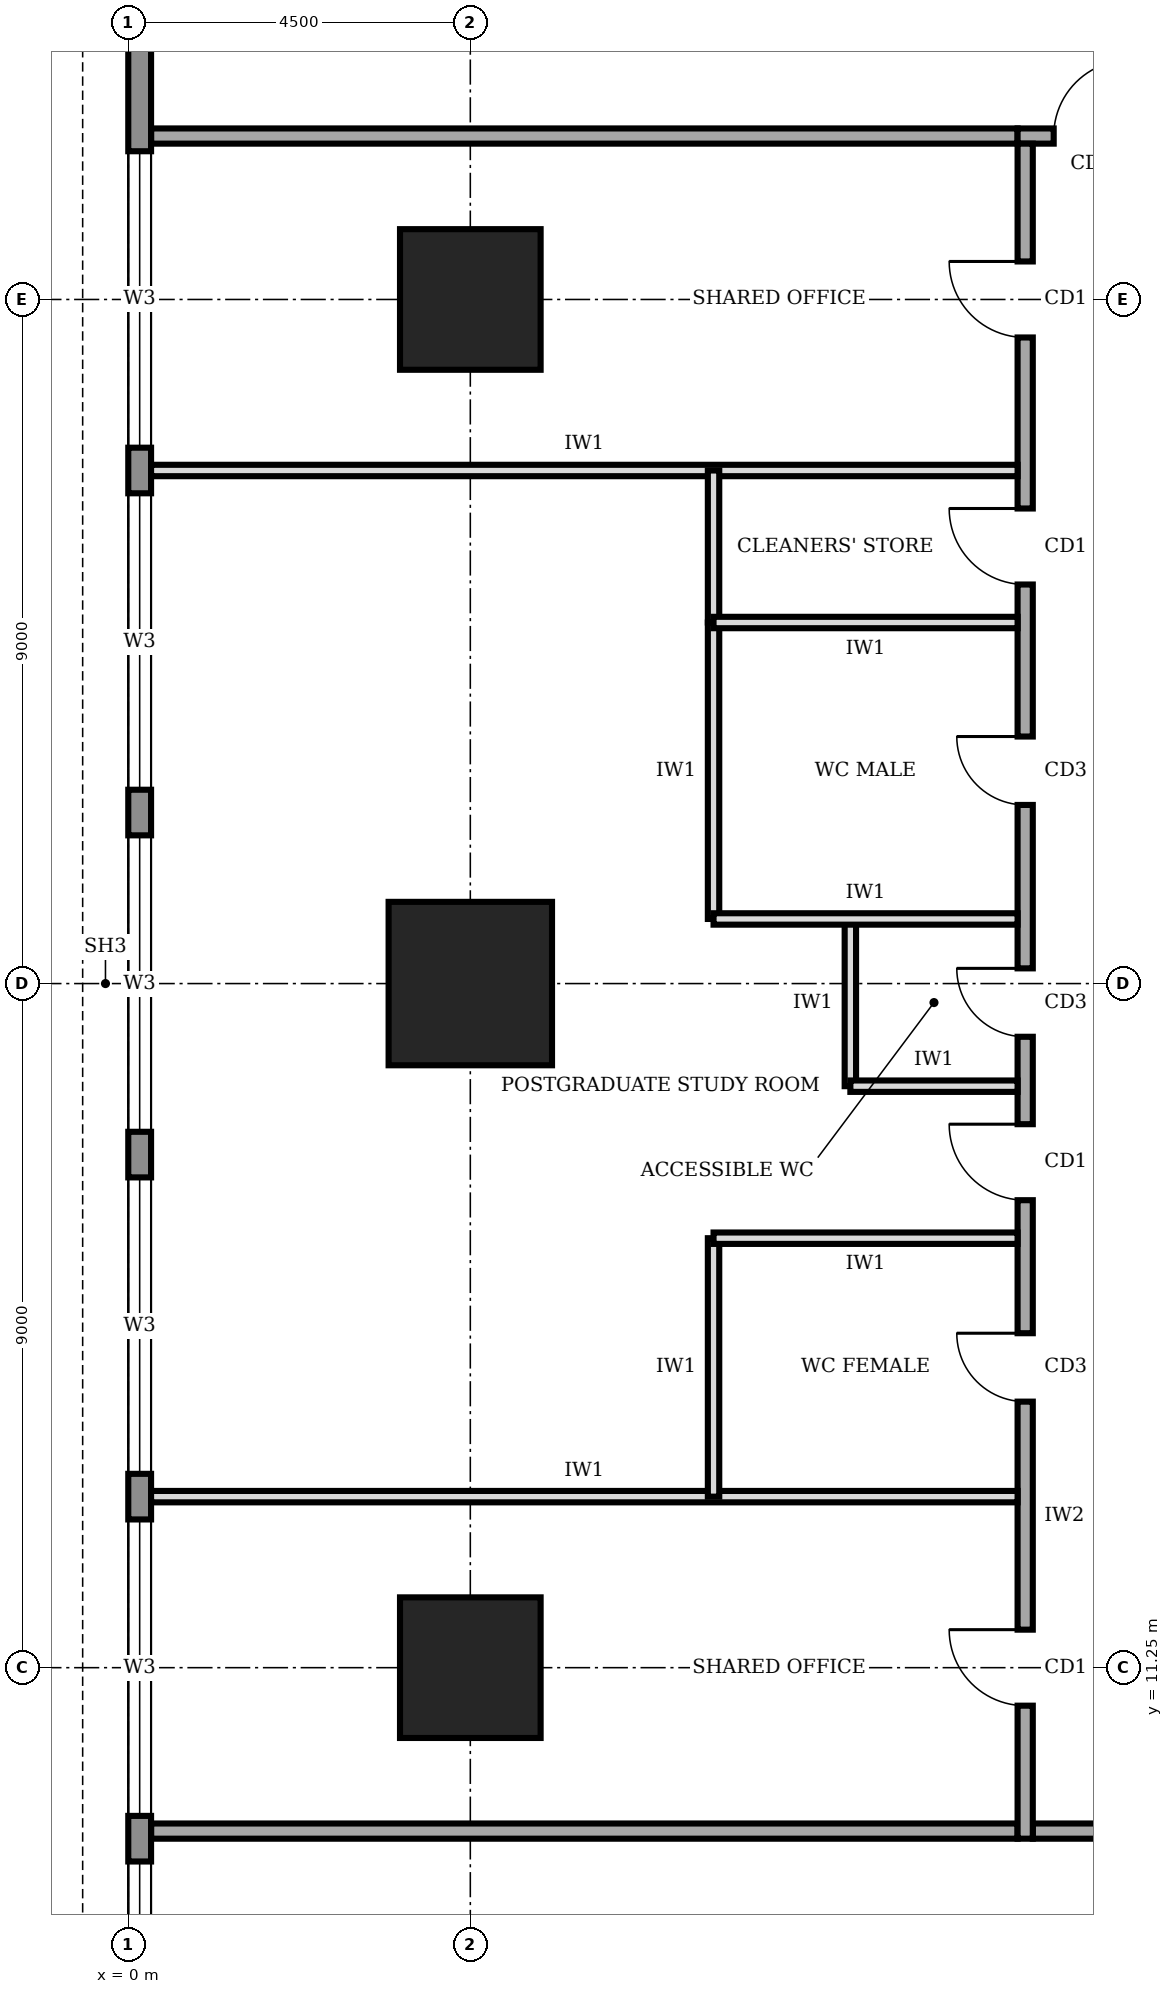
"""IFC4 building model, lengths in metres.
Left out: names, types, materials, properties, quantities, classifications, styles, units other than length and angle.
Written with IfcOpenShell. Run it as: python <this file> out.ifc"""

import sys

from ifc_helpers import new_model, si_unit, direction, frame, frame_2d, origin, origin_2d, place, context, subcontext, project, spatial, rectangle, extrude, element, fill, save


model = new_model("IFC4")
c1 = context("Model", 3, precision=1e-05, world=origin(), true_north=direction((0.0, 1.0)))
c2 = subcontext(c1, "Body", "Model", "MODEL_VIEW")
j1 = project(units=[si_unit("LENGTHUNIT", "METRE"), si_unit("PLANEANGLEUNIT", "RADIAN")], contexts=[c1])
p1 = place(None, origin())
s1 = spatial("IfcSite", under=j1, at=p1, CompositionType="ELEMENT")
p2 = place(p1, origin())
s2 = spatial("IfcBuilding", under=s1, at=p2, CompositionType="ELEMENT")
p3 = place(p2, frame((0.0, 0.0, 257.0)))
s3 = spatial("IfcBuildingStorey", under=s2, at=p3, CompositionType="ELEMENT", Elevation=257.0)
p4 = place(p3, frame((4.5, 11.25, 0.0), z_axis=(0.0, 0.0, 1.0), x_axis=(1.0, 0.0, 0.0)))
e1 = element("IfcColumn", 1, at=p4, inside=s3, PredefinedType="COLUMN", context=c2, shape_type="SweptSolid", body=[
    extrude(rectangle(XDim=1.85, YDim=1.85, at=origin_2d()), origin(), (0.0, 0.0, 1.0), 4.0),
])
p5 = place(p3, frame((4.5, 20.25, 0.0), z_axis=(0.0, 0.0, 1.0), x_axis=(1.0, 0.0, 0.0)))
e2 = element("IfcColumn", 2, at=p5, inside=s3, PredefinedType="COLUMN", context=c2, shape_type="SweptSolid", body=[
    extrude(rectangle(XDim=2.15, YDim=2.15, at=origin_2d()), origin(), (0.0, 0.0, 1.0), 4.0),
])
p6 = place(p3, frame((4.5, 29.25, 0.0), z_axis=(0.0, 0.0, 1.0), x_axis=(1.0, 0.0, 0.0)))
e3 = element("IfcColumn", 3, at=p6, inside=s3, PredefinedType="COLUMN", context=c2, shape_type="SweptSolid", body=[
    extrude(rectangle(XDim=1.85, YDim=1.85, at=origin_2d()), origin(), (0.0, 0.0, 1.0), 4.0),
])
p7 = place(p3, frame((0.15, 35.98, 0.0), z_axis=(0.0, 0.0, 1.0), x_axis=(0.0, -1.0, 0.0)))
e4 = element("IfcWall", 4, at=p7, inside=s3, PredefinedType="STANDARD", context=c2, shape_type="SweptSolid", body=[
    extrude(rectangle(XDim=31.46, YDim=0.3, at=frame_2d((15.73, 0.0))), origin(), (0.0, 0.0, 1.0), 3.75),
])
p8 = place(p7, frame((27.28, 0.0, 0.95)))
e5 = element("IfcOpeningElement", 5, at=p8, cuts=e4, PredefinedType="OPENING", context=c2, shape_type="SweptSolid", body=[
    extrude(rectangle(XDim=3.9, YDim=1.8, at=frame_2d((1.95, 0.9))), frame((0.0, 0.16, 0.0), z_axis=(0.0, -1.0, 0.0), x_axis=(1.0, 0.0, 0.0)), (0.0, 0.0, 1.0), 0.32),
])
p9 = place(p7, frame((22.78, 0.0, 0.95)))
e6 = element("IfcOpeningElement", 6, at=p9, cuts=e4, PredefinedType="OPENING", context=c2, shape_type="SweptSolid", body=[
    extrude(rectangle(XDim=3.9, YDim=1.8, at=frame_2d((1.95, 0.9))), frame((0.0, 0.16, 0.0), z_axis=(0.0, -1.0, 0.0), x_axis=(1.0, 0.0, 0.0)), (0.0, 0.0, 1.0), 0.32),
])
p10 = place(p7, frame((18.28, 0.0, 0.95)))
e7 = element("IfcOpeningElement", 7, at=p10, cuts=e4, PredefinedType="OPENING", context=c2, shape_type="SweptSolid", body=[
    extrude(rectangle(XDim=3.9, YDim=1.8, at=frame_2d((1.95, 0.9))), frame((0.0, 0.16, 0.0), z_axis=(0.0, -1.0, 0.0), x_axis=(1.0, 0.0, 0.0)), (0.0, 0.0, 1.0), 0.32),
])
p11 = place(p7, frame((13.78, 0.0, 0.95)))
e8 = element("IfcOpeningElement", 8, at=p11, cuts=e4, PredefinedType="OPENING", context=c2, shape_type="SweptSolid", body=[
    extrude(rectangle(XDim=3.9, YDim=1.8, at=frame_2d((1.95, 0.9))), frame((0.0, 0.16, 0.0), z_axis=(0.0, -1.0, 0.0), x_axis=(1.0, 0.0, 0.0)), (0.0, 0.0, 1.0), 0.32),
])
p12 = place(p7, frame((9.28, 0.0, 0.95)))
e9 = element("IfcOpeningElement", 9, at=p12, cuts=e4, PredefinedType="OPENING", context=c2, shape_type="SweptSolid", body=[
    extrude(rectangle(XDim=3.9, YDim=1.8, at=frame_2d((1.95, 0.9))), frame((0.0, 0.16, 0.0), z_axis=(0.0, -1.0, 0.0), x_axis=(1.0, 0.0, 0.0)), (0.0, 0.0, 1.0), 0.32),
])
p13 = place(p7, frame((4.78, 0.0, 0.95)))
e10 = element("IfcOpeningElement", 10, at=p13, cuts=e4, PredefinedType="OPENING", context=c2, shape_type="SweptSolid", body=[
    extrude(rectangle(XDim=3.9, YDim=1.8, at=frame_2d((1.95, 0.9))), frame((0.0, 0.16, 0.0), z_axis=(0.0, -1.0, 0.0), x_axis=(1.0, 0.0, 0.0)), (0.0, 0.0, 1.0), 0.32),
])
p14 = place(p3, frame((11.9, 9.1, 0.0), z_axis=(0.0, 0.0, 1.0), x_axis=(1.0, 0.0, 0.0)))
e11 = element("IfcWall", 11, at=p14, inside=s3, PredefinedType="SOLIDWALL", context=c2, shape_type="SweptSolid", body=[
    extrude(rectangle(XDim=16.9, YDim=0.2, at=frame_2d((8.45, 0.0))), origin(), (0.0, 0.0, 1.0), 3.75),
])
p15 = place(p14, frame((2.25, 0.0, 0.0)))
e12 = element("IfcOpeningElement", 12, at=p15, cuts=e11, PredefinedType="OPENING", context=c2, shape_type="SweptSolid", body=[
    extrude(rectangle(XDim=1.4, YDim=2.1, at=frame_2d((0.7, 1.05))), frame((0.0, 0.11, 0.0), z_axis=(0.0, -1.0, 0.0), x_axis=(1.0, 0.0, 0.0)), (0.0, 0.0, 1.0), 0.22),
])
p16 = place(p14, frame((10.8, 0.0, 0.0)))
e13 = element("IfcOpeningElement", 13, at=p16, cuts=e11, PredefinedType="OPENING", context=c2, shape_type="SweptSolid", body=[
    extrude(rectangle(XDim=1.4, YDim=2.1, at=frame_2d((0.7, 1.05))), frame((0.0, 0.11, 0.0), z_axis=(0.0, -1.0, 0.0), x_axis=(1.0, 0.0, 0.0)), (0.0, 0.0, 1.0), 0.22),
])
p17 = place(p3, frame((28.6, 31.4, 0.0), z_axis=(0.0, 0.0, 1.0), x_axis=(-1.0, 0.0, 0.0)))
e14 = element("IfcWall", 14, at=p17, inside=s3, PredefinedType="SOLIDWALL", context=c2, shape_type="SweptSolid", body=[
    extrude(rectangle(XDim=16.9, YDim=0.2, at=frame_2d((8.45, 0.0))), origin(), (0.0, 0.0, 1.0), 3.75),
])
p18 = place(p17, frame((15.425, 0.0, 0.0)))
e15 = element("IfcOpeningElement", 15, at=p18, cuts=e14, PredefinedType="OPENING", context=c2, shape_type="SweptSolid", body=[
    extrude(rectangle(XDim=1.0, YDim=2.1, at=frame_2d((0.5, 1.05))), frame((0.0, 0.11, 0.0), z_axis=(0.0, -1.0, 0.0), x_axis=(1.0, 0.0, 0.0)), (0.0, 0.0, 1.0), 0.22),
])
p19 = place(p17, frame((10.1, 0.0, 0.0)))
e16 = element("IfcOpeningElement", 16, at=p19, cuts=e14, PredefinedType="OPENING", context=c2, shape_type="SweptSolid", body=[
    extrude(rectangle(XDim=1.0, YDim=2.1, at=frame_2d((0.5, 1.05))), frame((0.0, 0.11, 0.0), z_axis=(0.0, -1.0, 0.0), x_axis=(1.0, 0.0, 0.0)), (0.0, 0.0, 1.0), 0.22),
])
p20 = place(p17, frame((2.25, 0.0, 0.0)))
e17 = element("IfcOpeningElement", 17, at=p20, cuts=e14, PredefinedType="OPENING", context=c2, shape_type="SweptSolid", body=[
    extrude(rectangle(XDim=1.4, YDim=2.1, at=frame_2d((0.7, 1.05))), frame((0.0, 0.11, 0.0), z_axis=(0.0, -1.0, 0.0), x_axis=(1.0, 0.0, 0.0)), (0.0, 0.0, 1.0), 0.22),
])
p21 = place(p3, frame((11.8, 31.3, 0.0), z_axis=(0.0, 0.0, 1.0), x_axis=(0.0, -1.0, 0.0)))
e18 = element("IfcWall", 18, at=p21, inside=s3, PredefinedType="SOLIDWALL", context=c2, shape_type="SweptSolid", body=[
    extrude(rectangle(XDim=22.3, YDim=0.2, at=frame_2d((11.15, 0.0))), origin(), (0.0, 0.0, 1.0), 3.75),
])
p22 = place(p21, frame((19.55, 0.0, 0.0)))
e19 = element("IfcOpeningElement", 19, at=p22, cuts=e18, PredefinedType="OPENING", context=c2, shape_type="SweptSolid", body=[
    extrude(rectangle(XDim=1.0, YDim=2.1, at=frame_2d((0.5, 1.05))), frame((0.0, 0.11, 0.0), z_axis=(0.0, -1.0, 0.0), x_axis=(1.0, 0.0, 0.0)), (0.0, 0.0, 1.0), 0.22),
])
p23 = place(p21, frame((15.65, 0.0, 0.0)))
e20 = element("IfcOpeningElement", 20, at=p23, cuts=e18, PredefinedType="OPENING", context=c2, shape_type="SweptSolid", body=[
    extrude(rectangle(XDim=0.9, YDim=2.1, at=frame_2d((0.45, 1.05))), frame((0.0, 0.11, 0.0), z_axis=(0.0, -1.0, 0.0), x_axis=(1.0, 0.0, 0.0)), (0.0, 0.0, 1.0), 0.22),
])
p24 = place(p21, frame((10.85, 0.0, 0.0)))
e21 = element("IfcOpeningElement", 21, at=p24, cuts=e18, PredefinedType="OPENING", context=c2, shape_type="SweptSolid", body=[
    extrude(rectangle(XDim=0.9, YDim=2.1, at=frame_2d((0.45, 1.05))), frame((0.0, 0.11, 0.0), z_axis=(0.0, -1.0, 0.0), x_axis=(1.0, 0.0, 0.0)), (0.0, 0.0, 1.0), 0.22),
])
p25 = place(p21, frame((7.8, 0.0, 0.0)))
e22 = element("IfcOpeningElement", 22, at=p25, cuts=e18, PredefinedType="OPENING", context=c2, shape_type="SweptSolid", body=[
    extrude(rectangle(XDim=0.9, YDim=2.1, at=frame_2d((0.45, 1.05))), frame((0.0, 0.11, 0.0), z_axis=(0.0, -1.0, 0.0), x_axis=(1.0, 0.0, 0.0)), (0.0, 0.0, 1.0), 0.22),
])
p26 = place(p21, frame((4.8, 0.0, 0.0)))
e23 = element("IfcOpeningElement", 23, at=p26, cuts=e18, PredefinedType="OPENING", context=c2, shape_type="SweptSolid", body=[
    extrude(rectangle(XDim=1.0, YDim=2.1, at=frame_2d((0.5, 1.05))), frame((0.0, 0.11, 0.0), z_axis=(0.0, -1.0, 0.0), x_axis=(1.0, 0.0, 0.0)), (0.0, 0.0, 1.0), 0.22),
])
p27 = place(p21, frame((12.9, 0.0, 0.0)))
e24 = element("IfcOpeningElement", 24, at=p27, cuts=e18, PredefinedType="OPENING", context=c2, shape_type="SweptSolid", body=[
    extrude(rectangle(XDim=1.0, YDim=2.1, at=frame_2d((0.5, 1.05))), frame((0.0, 0.11, 0.0), z_axis=(0.0, -1.0, 0.0), x_axis=(1.0, 0.0, 0.0)), (0.0, 0.0, 1.0), 0.22),
])
p28 = place(p21, frame((1.55, 0.0, 0.0)))
e25 = element("IfcOpeningElement", 25, at=p28, cuts=e18, PredefinedType="OPENING", context=c2, shape_type="SweptSolid", body=[
    extrude(rectangle(XDim=1.0, YDim=2.1, at=frame_2d((0.5, 1.05))), frame((0.0, 0.11, 0.0), z_axis=(0.0, -1.0, 0.0), x_axis=(1.0, 0.0, 0.0)), (0.0, 0.0, 1.0), 0.22),
])
for number, where, z_axis, x_axis in (
    (26, (0.3, 9.1, 0.0), (0.0, 0.0, 1.0), (1.0, 0.0, 0.0)),
    (27, (0.3, 31.4, 0.0), (0.0, 0.0, 1.0), (1.0, 0.0, 0.0)),
):
    element("IfcWall", number, at=place(p3, frame(where, z_axis=z_axis, x_axis=x_axis)), inside=s3, PredefinedType="SOLIDWALL", context=c2, shape_type="SweptSolid", body=[
        extrude(rectangle(XDim=11.4, YDim=0.2, at=frame_2d((5.7, 0.0))), origin(), (0.0, 0.0, 1.0), 3.75),
    ])
for number, where, z_axis, x_axis in (
    (28, (0.3, 13.5, 0.0), (0.0, 0.0, 1.0), (1.0, 0.0, 0.0)),
    (29, (0.3, 27.0, 0.0), (0.0, 0.0, 1.0), (1.0, 0.0, 0.0)),
):
    element("IfcWall", number, at=place(p3, frame(where, z_axis=z_axis, x_axis=x_axis)), inside=s3, PredefinedType="PARTITIONING", context=c2, shape_type="SweptSolid", body=[
        extrude(rectangle(XDim=11.4, YDim=0.15, at=frame_2d((5.7, 0.0))), origin(), (0.0, 0.0, 1.0), 3.75),
    ])
p29 = place(p3, frame((11.7, 16.9, 0.0), z_axis=(0.0, 0.0, 1.0), x_axis=(-1.0, 0.0, 0.0)))
e30 = element("IfcWall", 30, at=p29, inside=s3, PredefinedType="PARTITIONING", context=c2, shape_type="SweptSolid", body=[
    extrude(rectangle(XDim=4.0, YDim=0.15, at=frame_2d((2.0, 0.0))), origin(), (0.0, 0.0, 1.0), 3.75),
])
p30 = place(p3, frame((11.7, 18.9, 0.0), z_axis=(0.0, 0.0, 1.0), x_axis=(-1.0, 0.0, 0.0)))
e31 = element("IfcWall", 31, at=p30, inside=s3, PredefinedType="PARTITIONING", context=c2, shape_type="SweptSolid", body=[
    extrude(rectangle(XDim=2.2, YDim=0.15, at=frame_2d((1.1, 0.0))), origin(), (0.0, 0.0, 1.0), 3.75),
])
p31 = place(p3, frame((11.7, 21.1, 0.0), z_axis=(0.0, 0.0, 1.0), x_axis=(-1.0, 0.0, 0.0)))
e32 = element("IfcWall", 32, at=p31, inside=s3, PredefinedType="PARTITIONING", context=c2, shape_type="SweptSolid", body=[
    extrude(rectangle(XDim=4.0, YDim=0.15, at=frame_2d((2.0, 0.0))), origin(), (0.0, 0.0, 1.0), 2.85),
])
p32 = place(p3, frame((11.7, 25.0, 0.0), z_axis=(0.0, 0.0, 1.0), x_axis=(-1.0, 0.0, 0.0)))
e33 = element("IfcWall", 33, at=p32, inside=s3, PredefinedType="PARTITIONING", context=c2, shape_type="SweptSolid", body=[
    extrude(rectangle(XDim=4.0, YDim=0.15, at=frame_2d((2.0, 0.0))), origin(), (0.0, 0.0, 1.0), 3.75),
])
p33 = place(p3, frame((7.7, 13.5, 0.0), z_axis=(0.0, 0.0, 1.0), x_axis=(0.0, 1.0, 0.0)))
e34 = element("IfcWall", 34, at=p33, inside=s3, PredefinedType="PARTITIONING", context=c2, shape_type="SweptSolid", body=[
    extrude(rectangle(XDim=3.4, YDim=0.15, at=frame_2d((1.7, 0.0))), origin(), (0.0, 0.0, 1.0), 3.75),
])
p34 = place(p3, frame((9.5, 18.9, 0.0), z_axis=(0.0, 0.0, 1.0), x_axis=(0.0, 1.0, 0.0)))
e35 = element("IfcWall", 35, at=p34, inside=s3, PredefinedType="PARTITIONING", context=c2, shape_type="SweptSolid", body=[
    extrude(rectangle(XDim=2.2, YDim=0.15, at=frame_2d((1.1, 0.0))), origin(), (0.0, 0.0, 1.0), 3.75),
])
p35 = place(p3, frame((7.7, 21.1, 0.0), z_axis=(0.0, 0.0, 1.0), x_axis=(0.0, 1.0, 0.0)))
e36 = element("IfcWall", 36, at=p35, inside=s3, PredefinedType="PARTITIONING", context=c2, shape_type="SweptSolid", body=[
    extrude(rectangle(XDim=3.9, YDim=0.15, at=frame_2d((1.95, 0.0))), origin(), (0.0, 0.0, 1.0), 3.75),
])
p36 = place(p3, frame((7.7, 25.0, 0.0), z_axis=(0.0, 0.0, 1.0), x_axis=(0.0, 1.0, 0.0)))
e37 = element("IfcWall", 37, at=p36, inside=s3, PredefinedType="PARTITIONING", context=c2, shape_type="SweptSolid", body=[
    extrude(rectangle(XDim=2.0, YDim=0.15, at=frame_2d((1.0, 0.0))), origin(), (0.0, 0.0, 1.0), 3.75),
])
p37 = place(p8, origin())
e38 = element("IfcWindow", 38, at=p37, inside=s3, PartitioningType="SINGLE_PANEL", PredefinedType="WINDOW", context=c2, shape_type="SweptSolid", body=[
    extrude(rectangle(XDim=3.9, YDim=1.8, at=frame_2d((1.95, 0.9))), frame((0.0, 0.03, 0.0), z_axis=(0.0, -1.0, 0.0), x_axis=(1.0, 0.0, 0.0)), (0.0, 0.0, 1.0), 0.06),
])
fill(e5, e38)
p38 = place(p9, origin())
e39 = element("IfcWindow", 39, at=p38, inside=s3, PartitioningType="SINGLE_PANEL", PredefinedType="WINDOW", context=c2, shape_type="SweptSolid", body=[
    extrude(rectangle(XDim=3.9, YDim=1.8, at=frame_2d((1.95, 0.9))), frame((0.0, 0.03, 0.0), z_axis=(0.0, -1.0, 0.0), x_axis=(1.0, 0.0, 0.0)), (0.0, 0.0, 1.0), 0.06),
])
fill(e6, e39)
p39 = place(p10, origin())
e40 = element("IfcWindow", 40, at=p39, inside=s3, PartitioningType="SINGLE_PANEL", PredefinedType="WINDOW", context=c2, shape_type="SweptSolid", body=[
    extrude(rectangle(XDim=3.9, YDim=1.8, at=frame_2d((1.95, 0.9))), frame((0.0, 0.03, 0.0), z_axis=(0.0, -1.0, 0.0), x_axis=(1.0, 0.0, 0.0)), (0.0, 0.0, 1.0), 0.06),
])
fill(e7, e40)
p40 = place(p11, origin())
e41 = element("IfcWindow", 41, at=p40, inside=s3, PartitioningType="SINGLE_PANEL", PredefinedType="WINDOW", context=c2, shape_type="SweptSolid", body=[
    extrude(rectangle(XDim=3.9, YDim=1.8, at=frame_2d((1.95, 0.9))), frame((0.0, 0.03, 0.0), z_axis=(0.0, -1.0, 0.0), x_axis=(1.0, 0.0, 0.0)), (0.0, 0.0, 1.0), 0.06),
])
fill(e8, e41)
p41 = place(p12, origin())
e42 = element("IfcWindow", 42, at=p41, inside=s3, PartitioningType="SINGLE_PANEL", PredefinedType="WINDOW", context=c2, shape_type="SweptSolid", body=[
    extrude(rectangle(XDim=3.9, YDim=1.8, at=frame_2d((1.95, 0.9))), frame((0.0, 0.03, 0.0), z_axis=(0.0, -1.0, 0.0), x_axis=(1.0, 0.0, 0.0)), (0.0, 0.0, 1.0), 0.06),
])
fill(e9, e42)
p42 = place(p13, origin())
e43 = element("IfcWindow", 43, at=p42, inside=s3, PartitioningType="SINGLE_PANEL", PredefinedType="WINDOW", context=c2, shape_type="SweptSolid", body=[
    extrude(rectangle(XDim=3.9, YDim=1.8, at=frame_2d((1.95, 0.9))), frame((0.0, 0.03, 0.0), z_axis=(0.0, -1.0, 0.0), x_axis=(1.0, 0.0, 0.0)), (0.0, 0.0, 1.0), 0.06),
])
fill(e10, e43)
p43 = place(p18, frame((1.0, 0.0, 0.0), z_axis=(0.0, 0.0, 1.0), x_axis=(-1.0, 0.0, 0.0)))
e44 = element("IfcDoor", 44, at=p43, inside=s3, OperationType="SINGLE_SWING_RIGHT", PredefinedType="DOOR", context=c2, shape_type="SweptSolid", body=[
    extrude(rectangle(XDim=1.0, YDim=2.1, at=frame_2d((0.5, 1.05))), frame((0.0, 0.025, 0.0), z_axis=(0.0, -1.0, 0.0), x_axis=(1.0, 0.0, 0.0)), (0.0, 0.0, 1.0), 0.05),
])
fill(e15, e44)
p44 = place(p22, frame((1.0, 0.0, 0.0), z_axis=(0.0, 0.0, 1.0), x_axis=(-1.0, 0.0, 0.0)))
e45 = element("IfcDoor", 45, at=p44, inside=s3, OperationType="SINGLE_SWING_RIGHT", PredefinedType="DOOR", context=c2, shape_type="SweptSolid", body=[
    extrude(rectangle(XDim=1.0, YDim=2.1, at=frame_2d((0.5, 1.05))), frame((0.0, 0.025, 0.0), z_axis=(0.0, -1.0, 0.0), x_axis=(1.0, 0.0, 0.0)), (0.0, 0.0, 1.0), 0.05),
])
fill(e19, e45)
p45 = place(p23, frame((0.9, 0.0, 0.0), z_axis=(0.0, 0.0, 1.0), x_axis=(-1.0, 0.0, 0.0)))
e46 = element("IfcDoor", 46, at=p45, inside=s3, OperationType="SINGLE_SWING_RIGHT", PredefinedType="DOOR", context=c2, shape_type="SweptSolid", body=[
    extrude(rectangle(XDim=0.9, YDim=2.1, at=frame_2d((0.45, 1.05))), frame((0.0, 0.025, 0.0), z_axis=(0.0, -1.0, 0.0), x_axis=(1.0, 0.0, 0.0)), (0.0, 0.0, 1.0), 0.05),
])
fill(e20, e46)
p46 = place(p24, frame((0.9, 0.0, 0.0), z_axis=(0.0, 0.0, 1.0), x_axis=(-1.0, 0.0, 0.0)))
e47 = element("IfcDoor", 47, at=p46, inside=s3, OperationType="SINGLE_SWING_RIGHT", PredefinedType="DOOR", context=c2, shape_type="SweptSolid", body=[
    extrude(rectangle(XDim=0.9, YDim=2.1, at=frame_2d((0.45, 1.05))), frame((0.0, 0.025, 0.0), z_axis=(0.0, -1.0, 0.0), x_axis=(1.0, 0.0, 0.0)), (0.0, 0.0, 1.0), 0.05),
])
fill(e21, e47)
p47 = place(p25, frame((0.9, 0.0, 0.0), z_axis=(0.0, 0.0, 1.0), x_axis=(-1.0, 0.0, 0.0)))
e48 = element("IfcDoor", 48, at=p47, inside=s3, OperationType="SINGLE_SWING_RIGHT", PredefinedType="DOOR", context=c2, shape_type="SweptSolid", body=[
    extrude(rectangle(XDim=0.9, YDim=2.1, at=frame_2d((0.45, 1.05))), frame((0.0, 0.025, 0.0), z_axis=(0.0, -1.0, 0.0), x_axis=(1.0, 0.0, 0.0)), (0.0, 0.0, 1.0), 0.05),
])
fill(e22, e48)
p48 = place(p26, frame((1.0, 0.0, 0.0), z_axis=(0.0, 0.0, 1.0), x_axis=(-1.0, 0.0, 0.0)))
e49 = element("IfcDoor", 49, at=p48, inside=s3, OperationType="SINGLE_SWING_RIGHT", PredefinedType="DOOR", context=c2, shape_type="SweptSolid", body=[
    extrude(rectangle(XDim=1.0, YDim=2.1, at=frame_2d((0.5, 1.05))), frame((0.0, 0.025, 0.0), z_axis=(0.0, -1.0, 0.0), x_axis=(1.0, 0.0, 0.0)), (0.0, 0.0, 1.0), 0.05),
])
fill(e23, e49)
p49 = place(p27, frame((1.0, 0.0, 0.0), z_axis=(0.0, 0.0, 1.0), x_axis=(-1.0, 0.0, 0.0)))
e50 = element("IfcDoor", 50, at=p49, inside=s3, OperationType="SINGLE_SWING_RIGHT", PredefinedType="DOOR", context=c2, shape_type="SweptSolid", body=[
    extrude(rectangle(XDim=1.0, YDim=2.1, at=frame_2d((0.5, 1.05))), frame((0.0, 0.025, 0.0), z_axis=(0.0, -1.0, 0.0), x_axis=(1.0, 0.0, 0.0)), (0.0, 0.0, 1.0), 0.05),
])
fill(e24, e50)
p50 = place(p28, frame((1.0, 0.0, 0.0), z_axis=(0.0, 0.0, 1.0), x_axis=(-1.0, 0.0, 0.0)))
e51 = element("IfcDoor", 51, at=p50, inside=s3, OperationType="SINGLE_SWING_RIGHT", PredefinedType="DOOR", context=c2, shape_type="SweptSolid", body=[
    extrude(rectangle(XDim=1.0, YDim=2.1, at=frame_2d((0.5, 1.05))), frame((0.0, 0.025, 0.0), z_axis=(0.0, -1.0, 0.0), x_axis=(1.0, 0.0, 0.0)), (0.0, 0.0, 1.0), 0.05),
])
fill(e25, e51)
save(model, sys.argv[1])
